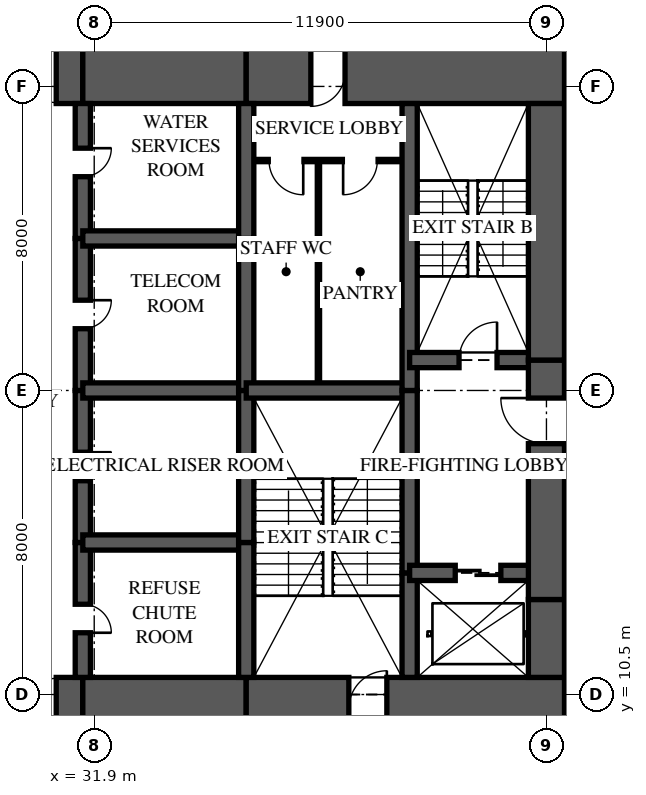
"""IFC4 building model, lengths in metres.
Left out: names, types, materials, properties, quantities, classifications, styles, units other than length and angle.
Written with IfcOpenShell. Run it as: python <this file> out.ifc"""

import sys

from ifc_helpers import new_model, si_unit, direction, frame, frame_2d, origin, place, context, subcontext, project, spatial, rectangle, extrude, element, fill, save


model = new_model("IFC4")
c1 = context("Model", 3, precision=1e-05, world=origin(), true_north=direction((0.0, 1.0)))
c2 = subcontext(c1, "Body", "Model", "MODEL_VIEW")
j1 = project(units=[si_unit("LENGTHUNIT", "METRE"), si_unit("PLANEANGLEUNIT", "RADIAN")], contexts=[c1])
p1 = place(None, origin())
s1 = spatial("IfcSite", under=j1, at=p1, CompositionType="ELEMENT")
p2 = place(p1, origin())
s2 = spatial("IfcBuilding", under=s1, at=p2, CompositionType="ELEMENT")
p3 = place(p2, frame((0.0, 0.0, 21.0)))
s3 = spatial("IfcBuildingStorey", under=s2, at=p3, CompositionType="ELEMENT", Elevation=21.0)
p4 = place(p3, frame((26.0, 10.125, 0.0), z_axis=(0.0, 0.0, 1.0), x_axis=(1.0, 0.0, 0.0)))
e1 = element("IfcWall", 1, at=p4, inside=s3, PredefinedType="SHEAR", context=c2, shape_type="SweptSolid", body=[
    extrude(rectangle(XDim=5.6, YDim=1.65, at=frame_2d((2.8, 0.0))), origin(), (0.0, 0.0, 1.0), 3.35),
])
p5 = place(p4, frame((3.3, 0.0, 0.0)))
e2 = element("IfcOpeningElement", 2, at=p5, cuts=e1, PredefinedType="OPENING", context=c2, shape_type="SweptSolid", body=[
    extrude(rectangle(XDim=1.6, YDim=2.1, at=frame_2d((0.8, 1.05))), frame((0.0, 0.835, 0.0), z_axis=(0.0, -1.0, 0.0), x_axis=(1.0, 0.0, 0.0)), (0.0, 0.0, 1.0), 1.67),
])
p6 = place(p3, frame((31.6, 10.125, 0.0), z_axis=(0.0, 0.0, 1.0), x_axis=(1.0, 0.0, 0.0)))
e3 = element("IfcWall", 3, at=p6, inside=s3, PredefinedType="SHEAR", context=c2, shape_type="SweptSolid", body=[
    extrude(rectangle(XDim=4.3, YDim=1.65, at=frame_2d((2.15, 0.0))), origin(), (0.0, 0.0, 1.0), 3.35),
])
p7 = place(p3, frame((35.9, 10.125, 0.0), z_axis=(0.0, 0.0, 1.0), x_axis=(1.0, 0.0, 0.0)))
e4 = element("IfcWall", 4, at=p7, inside=s3, PredefinedType="SHEAR", context=c2, shape_type="SweptSolid", body=[
    extrude(rectangle(XDim=8.375, YDim=1.65, at=frame_2d((4.188, 0.0))), origin(), (0.0, 0.0, 1.0), 3.35),
])
p8 = place(p7, frame((2.7, 0.0, 0.0)))
e5 = element("IfcOpeningElement", 5, at=p8, cuts=e4, PredefinedType="OPENING", context=c2, shape_type="SweptSolid", body=[
    extrude(rectangle(XDim=1.0, YDim=2.1, at=frame_2d((0.5, 1.05))), frame((0.0, 0.835, 0.0), z_axis=(0.0, -1.0, 0.0), x_axis=(1.0, 0.0, 0.0)), (0.0, 0.0, 1.0), 1.67),
])
p9 = place(p3, frame((44.275, 26.875, 0.0), z_axis=(0.0, 0.0, 1.0), x_axis=(-1.0, 0.0, 0.0)))
e6 = element("IfcWall", 6, at=p9, inside=s3, PredefinedType="SHEAR", context=c2, shape_type="SweptSolid", body=[
    extrude(rectangle(XDim=8.375, YDim=1.65, at=frame_2d((4.188, 0.0))), origin(), (0.0, 0.0, 1.0), 3.35),
])
p10 = place(p9, frame((5.775, 0.0, 0.0)))
e7 = element("IfcOpeningElement", 7, at=p10, cuts=e6, PredefinedType="OPENING", context=c2, shape_type="SweptSolid", body=[
    extrude(rectangle(XDim=0.9, YDim=2.1, at=frame_2d((0.45, 1.05))), frame((0.0, 0.835, 0.0), z_axis=(0.0, -1.0, 0.0), x_axis=(1.0, 0.0, 0.0)), (0.0, 0.0, 1.0), 1.67),
])
p11 = place(p3, frame((35.9, 26.875, 0.0), z_axis=(0.0, 0.0, 1.0), x_axis=(-1.0, 0.0, 0.0)))
e8 = element("IfcWall", 8, at=p11, inside=s3, PredefinedType="SHEAR", context=c2, shape_type="SweptSolid", body=[
    extrude(rectangle(XDim=4.3, YDim=1.65, at=frame_2d((2.15, 0.0))), origin(), (0.0, 0.0, 1.0), 3.35),
])
p12 = place(p3, frame((31.6, 26.875, 0.0), z_axis=(0.0, 0.0, 1.0), x_axis=(-1.0, 0.0, 0.0)))
e9 = element("IfcWall", 9, at=p12, inside=s3, PredefinedType="SHEAR", context=c2, shape_type="SweptSolid", body=[
    extrude(rectangle(XDim=5.6, YDim=1.65, at=frame_2d((2.8, 0.0))), origin(), (0.0, 0.0, 1.0), 3.35),
])
p13 = place(p12, frame((0.7, 0.0, 0.0)))
e10 = element("IfcOpeningElement", 10, at=p13, cuts=e9, PredefinedType="OPENING", context=c2, shape_type="SweptSolid", body=[
    extrude(rectangle(XDim=1.6, YDim=2.1, at=frame_2d((0.8, 1.05))), frame((0.0, 0.835, 0.0), z_axis=(0.0, -1.0, 0.0), x_axis=(1.0, 0.0, 0.0)), (0.0, 0.0, 1.0), 1.67),
])
p14 = place(p3, frame((43.8, 10.95, 0.0), z_axis=(0.0, 0.0, 1.0), x_axis=(0.0, 1.0, 0.0)))
e11 = element("IfcWall", 11, at=p14, inside=s3, PredefinedType="SHEAR", context=c2, shape_type="SweptSolid", body=[
    extrude(rectangle(XDim=2.05, YDim=0.95, at=frame_2d((1.025, 0.0))), origin(), (0.0, 0.0, 1.0), 3.35),
])
p15 = place(p3, frame((43.8, 13.0, 0.0), z_axis=(0.0, 0.0, 1.0), x_axis=(0.0, 1.0, 0.0)))
e12 = element("IfcWall", 12, at=p15, inside=s3, PredefinedType="SHEAR", context=c2, shape_type="SweptSolid", body=[
    extrude(rectangle(XDim=6.3, YDim=0.95, at=frame_2d((3.15, 0.0))), origin(), (0.0, 0.0, 1.0), 3.35),
])
p16 = place(p15, frame((4.1, 0.0, 0.0)))
e13 = element("IfcOpeningElement", 13, at=p16, cuts=e12, PredefinedType="OPENING", context=c2, shape_type="SweptSolid", body=[
    extrude(rectangle(XDim=1.2, YDim=2.2, at=frame_2d((0.6, 1.1))), frame((0.0, 0.485, 0.0), z_axis=(0.0, -1.0, 0.0), x_axis=(1.0, 0.0, 0.0)), (0.0, 0.0, 1.0), 0.97),
])
p17 = place(p3, frame((43.8, 19.3, 0.0), z_axis=(0.0, 0.0, 1.0), x_axis=(0.0, 1.0, 0.0)))
e14 = element("IfcWall", 14, at=p17, inside=s3, PredefinedType="SHEAR", context=c2, shape_type="SweptSolid", body=[
    extrude(rectangle(XDim=6.75, YDim=0.95, at=frame_2d((3.375, 0.0))), origin(), (0.0, 0.0, 1.0), 3.35),
])
p18 = place(p3, frame((31.6, 10.95, 0.0), z_axis=(0.0, 0.0, 1.0), x_axis=(0.0, 1.0, 0.0)))
e15 = element("IfcWall", 15, at=p18, inside=s3, PredefinedType="SHEAR", context=c2, shape_type="SweptSolid", body=[
    extrude(rectangle(XDim=3.55, YDim=0.4, at=frame_2d((1.775, 0.0))), origin(), (0.0, 0.0, 1.0), 3.35),
])
p19 = place(p18, frame((1.175, 0.0, 0.0)))
e16 = element("IfcOpeningElement", 16, at=p19, cuts=e15, PredefinedType="OPENING", context=c2, shape_type="SweptSolid", body=[
    extrude(rectangle(XDim=0.75, YDim=2.1, at=frame_2d((0.375, 1.05))), frame((0.0, 0.21, 0.0), z_axis=(0.0, -1.0, 0.0), x_axis=(1.0, 0.0, 0.0)), (0.0, 0.0, 1.0), 0.42),
])
p20 = place(p3, frame((31.6, 14.5, 0.0), z_axis=(0.0, 0.0, 1.0), x_axis=(0.0, 1.0, 0.0)))
e17 = element("IfcWall", 17, at=p20, inside=s3, PredefinedType="SHEAR", context=c2, shape_type="SweptSolid", body=[
    extrude(rectangle(XDim=4.0, YDim=0.4, at=frame_2d((2.0, 0.0))), origin(), (0.0, 0.0, 1.0), 3.35),
])
p21 = place(p20, frame((1.625, 0.0, 0.0)))
e18 = element("IfcOpeningElement", 18, at=p21, cuts=e17, PredefinedType="OPENING", context=c2, shape_type="SweptSolid", body=[
    extrude(rectangle(XDim=0.75, YDim=2.1, at=frame_2d((0.375, 1.05))), frame((0.0, 0.21, 0.0), z_axis=(0.0, -1.0, 0.0), x_axis=(1.0, 0.0, 0.0)), (0.0, 0.0, 1.0), 0.42),
])
p22 = place(p3, frame((31.6, 18.5, 0.0), z_axis=(0.0, 0.0, 1.0), x_axis=(0.0, 1.0, 0.0)))
e19 = element("IfcWall", 19, at=p22, inside=s3, PredefinedType="SHEAR", context=c2, shape_type="SweptSolid", body=[
    extrude(rectangle(XDim=4.0, YDim=0.4, at=frame_2d((2.0, 0.0))), origin(), (0.0, 0.0, 1.0), 3.35),
])
p23 = place(p22, frame((1.625, 0.0, 0.0)))
e20 = element("IfcOpeningElement", 20, at=p23, cuts=e19, PredefinedType="OPENING", context=c2, shape_type="SweptSolid", body=[
    extrude(rectangle(XDim=0.75, YDim=2.1, at=frame_2d((0.375, 1.05))), frame((0.0, 0.21, 0.0), z_axis=(0.0, -1.0, 0.0), x_axis=(1.0, 0.0, 0.0)), (0.0, 0.0, 1.0), 0.42),
])
p24 = place(p3, frame((31.6, 22.5, 0.0), z_axis=(0.0, 0.0, 1.0), x_axis=(0.0, 1.0, 0.0)))
e21 = element("IfcWall", 21, at=p24, inside=s3, PredefinedType="SHEAR", context=c2, shape_type="SweptSolid", body=[
    extrude(rectangle(XDim=3.55, YDim=0.4, at=frame_2d((1.775, 0.0))), origin(), (0.0, 0.0, 1.0), 3.35),
])
p25 = place(p24, frame((1.625, 0.0, 0.0)))
e22 = element("IfcOpeningElement", 22, at=p25, cuts=e21, PredefinedType="OPENING", context=c2, shape_type="SweptSolid", body=[
    extrude(rectangle(XDim=0.75, YDim=2.1, at=frame_2d((0.375, 1.05))), frame((0.0, 0.21, 0.0), z_axis=(0.0, -1.0, 0.0), x_axis=(1.0, 0.0, 0.0)), (0.0, 0.0, 1.0), 0.42),
])
p26 = place(p3, frame((35.9, 10.95, 0.0), z_axis=(0.0, 0.0, 1.0), x_axis=(0.0, 1.0, 0.0)))
e23 = element("IfcWall", 23, at=p26, inside=s3, PredefinedType="SHEAR", context=c2, shape_type="SweptSolid", body=[
    extrude(rectangle(XDim=3.55, YDim=0.4, at=frame_2d((1.775, 0.0))), origin(), (0.0, 0.0, 1.0), 3.35),
])
for number, where, z_axis, x_axis in (
    (24, (35.9, 14.5, 0.0), (0.0, 0.0, 1.0), (0.0, 1.0, 0.0)),
    (25, (35.9, 18.5, 0.0), (0.0, 0.0, 1.0), (0.0, 1.0, 0.0)),
):
    element("IfcWall", number, at=place(p3, frame(where, z_axis=z_axis, x_axis=x_axis)), inside=s3, PredefinedType="SHEAR", context=c2, shape_type="SweptSolid", body=[
        extrude(rectangle(XDim=4.0, YDim=0.4, at=frame_2d((2.0, 0.0))), origin(), (0.0, 0.0, 1.0), 3.35),
    ])
p27 = place(p3, frame((35.9, 22.5, 0.0), z_axis=(0.0, 0.0, 1.0), x_axis=(0.0, 1.0, 0.0)))
e26 = element("IfcWall", 26, at=p27, inside=s3, PredefinedType="SHEAR", context=c2, shape_type="SweptSolid", body=[
    extrude(rectangle(XDim=3.55, YDim=0.4, at=frame_2d((1.775, 0.0))), origin(), (0.0, 0.0, 1.0), 3.35),
])
p28 = place(p3, frame((40.2, 10.95, 0.0), z_axis=(0.0, 0.0, 1.0), x_axis=(0.0, 1.0, 0.0)))
e27 = element("IfcWall", 27, at=p28, inside=s3, PredefinedType="SHEAR", context=c2, shape_type="SweptSolid", body=[
    extrude(rectangle(XDim=2.75, YDim=0.4, at=frame_2d((1.375, 0.0))), origin(), (0.0, 0.0, 1.0), 3.35),
])
p29 = place(p3, frame((40.2, 13.7, 0.0), z_axis=(0.0, 0.0, 1.0), x_axis=(0.0, 1.0, 0.0)))
e28 = element("IfcWall", 28, at=p29, inside=s3, PredefinedType="SHEAR", context=c2, shape_type="SweptSolid", body=[
    extrude(rectangle(XDim=4.8, YDim=0.4, at=frame_2d((2.4, 0.0))), origin(), (0.0, 0.0, 1.0), 3.35),
])
p30 = place(p3, frame((40.2, 18.5, 0.0), z_axis=(0.0, 0.0, 1.0), x_axis=(0.0, 1.0, 0.0)))
e29 = element("IfcWall", 29, at=p30, inside=s3, PredefinedType="SHEAR", context=c2, shape_type="SweptSolid", body=[
    extrude(rectangle(XDim=7.55, YDim=0.4, at=frame_2d((3.775, 0.0))), origin(), (0.0, 0.0, 1.0), 3.35),
])
for number, where, z_axis, x_axis in (
    (30, (31.6, 14.5, 0.0), (0.0, 0.0, 1.0), (1.0, 0.0, 0.0)),
    (31, (31.6, 18.5, 0.0), (0.0, 0.0, 1.0), (1.0, 0.0, 0.0)),
    (32, (31.6, 22.5, 0.0), (0.0, 0.0, 1.0), (1.0, 0.0, 0.0)),
):
    element("IfcWall", number, at=place(p3, frame(where, z_axis=z_axis, x_axis=x_axis)), inside=s3, PredefinedType="SHEAR", context=c2, shape_type="SweptSolid", body=[
        extrude(rectangle(XDim=4.3, YDim=0.4, at=frame_2d((2.15, 0.0))), origin(), (0.0, 0.0, 1.0), 3.35),
    ])
p31 = place(p3, frame((35.9, 18.5, 0.0), z_axis=(0.0, 0.0, 1.0), x_axis=(1.0, 0.0, 0.0)))
e33 = element("IfcWall", 33, at=p31, inside=s3, PredefinedType="SHEAR", context=c2, shape_type="SweptSolid", body=[
    extrude(rectangle(XDim=4.3, YDim=0.4, at=frame_2d((2.15, 0.0))), origin(), (0.0, 0.0, 1.0), 3.35),
])
p32 = place(p3, frame((40.2, 13.7, 0.0), z_axis=(0.0, 0.0, 1.0), x_axis=(1.0, 0.0, 0.0)))
e34 = element("IfcWall", 34, at=p32, inside=s3, PredefinedType="SHEAR", context=c2, shape_type="SweptSolid", body=[
    extrude(rectangle(XDim=3.6, YDim=0.4, at=frame_2d((1.8, 0.0))), origin(), (0.0, 0.0, 1.0), 3.35),
])
p33 = place(p32, frame((1.2, 0.0, 0.0)))
e35 = element("IfcOpeningElement", 35, at=p33, cuts=e34, PredefinedType="OPENING", context=c2, shape_type="SweptSolid", body=[
    extrude(rectangle(XDim=1.2, YDim=2.1, at=frame_2d((0.6, 1.05))), frame((0.0, 0.21, 0.0), z_axis=(0.0, -1.0, 0.0), x_axis=(1.0, 0.0, 0.0)), (0.0, 0.0, 1.0), 0.42),
])
p34 = place(p3, frame((40.2, 19.3, 0.0), z_axis=(0.0, 0.0, 1.0), x_axis=(1.0, 0.0, 0.0)))
e36 = element("IfcWall", 36, at=p34, inside=s3, PredefinedType="SHEAR", context=c2, shape_type="SweptSolid", body=[
    extrude(rectangle(XDim=3.6, YDim=0.4, at=frame_2d((1.8, 0.0))), origin(), (0.0, 0.0, 1.0), 3.35),
])
p35 = place(p34, frame((1.3, 0.0, 0.0)))
e37 = element("IfcOpeningElement", 37, at=p35, cuts=e36, PredefinedType="OPENING", context=c2, shape_type="SweptSolid", body=[
    extrude(rectangle(XDim=1.0, YDim=2.1, at=frame_2d((0.5, 1.05))), frame((0.0, 0.21, 0.0), z_axis=(0.0, -1.0, 0.0), x_axis=(1.0, 0.0, 0.0)), (0.0, 0.0, 1.0), 0.42),
])
p36 = place(p3, frame((36.1, 24.55, 0.0), z_axis=(0.0, 0.0, 1.0), x_axis=(1.0, 0.0, 0.0)))
e38 = element("IfcWall", 38, at=p36, inside=s3, PredefinedType="PARTITIONING", context=c2, shape_type="SweptSolid", body=[
    extrude(rectangle(XDim=3.9, YDim=0.1, at=frame_2d((1.95, 0.0))), origin(), (0.0, 0.0, 1.0), 3.11),
])
p37 = place(p36, frame((0.4, 0.0, 0.0)))
e39 = element("IfcOpeningElement", 39, at=p37, cuts=e38, PredefinedType="OPENING", context=c2, shape_type="SweptSolid", body=[
    extrude(rectangle(XDim=0.9, YDim=2.1, at=frame_2d((0.45, 1.05))), frame((0.0, 0.06, 0.0), z_axis=(0.0, -1.0, 0.0), x_axis=(1.0, 0.0, 0.0)), (0.0, 0.0, 1.0), 0.12),
])
p38 = place(p36, frame((2.35, 0.0, 0.0)))
e40 = element("IfcOpeningElement", 40, at=p38, cuts=e38, PredefinedType="OPENING", context=c2, shape_type="SweptSolid", body=[
    extrude(rectangle(XDim=0.9, YDim=2.1, at=frame_2d((0.45, 1.05))), frame((0.0, 0.06, 0.0), z_axis=(0.0, -1.0, 0.0), x_axis=(1.0, 0.0, 0.0)), (0.0, 0.0, 1.0), 0.12),
])
p39 = place(p3, frame((37.8, 18.7, 0.0), z_axis=(0.0, 0.0, 1.0), x_axis=(0.0, 1.0, 0.0)))
e41 = element("IfcWall", 41, at=p39, inside=s3, PredefinedType="PARTITIONING", context=c2, shape_type="SweptSolid", body=[
    extrude(rectangle(XDim=5.8, YDim=0.1, at=frame_2d((2.9, 0.0))), origin(), (0.0, 0.0, 1.0), 3.11),
])
p40 = place(p37, frame((0.9, 0.0, 0.0), z_axis=(0.0, 0.0, 1.0), x_axis=(-1.0, 0.0, 0.0)))
e42 = element("IfcDoor", 42, at=p40, inside=s3, OperationType="SINGLE_SWING_LEFT", PredefinedType="DOOR", context=c2, shape_type="SweptSolid", body=[
    extrude(rectangle(XDim=0.9, YDim=2.1, at=frame_2d((0.45, 1.05))), frame((0.0, 0.025, 0.0), z_axis=(0.0, -1.0, 0.0), x_axis=(1.0, 0.0, 0.0)), (0.0, 0.0, 1.0), 0.05),
])
fill(e39, e42)
p41 = place(p38, frame((0.9, 0.0, 0.0), z_axis=(0.0, 0.0, 1.0), x_axis=(-1.0, 0.0, 0.0)))
e43 = element("IfcDoor", 43, at=p41, inside=s3, OperationType="SINGLE_SWING_RIGHT", PredefinedType="DOOR", context=c2, shape_type="SweptSolid", body=[
    extrude(rectangle(XDim=0.9, YDim=2.1, at=frame_2d((0.45, 1.05))), frame((0.0, 0.025, 0.0), z_axis=(0.0, -1.0, 0.0), x_axis=(1.0, 0.0, 0.0)), (0.0, 0.0, 1.0), 0.05),
])
fill(e40, e43)
p42 = place(p35, origin())
e44 = element("IfcDoor", 44, at=p42, inside=s3, OperationType="SINGLE_SWING_RIGHT", PredefinedType="DOOR", context=c2, shape_type="SweptSolid", body=[
    extrude(rectangle(XDim=1.0, YDim=2.1, at=frame_2d((0.5, 1.05))), frame((0.0, 0.025, 0.0), z_axis=(0.0, -1.0, 0.0), x_axis=(1.0, 0.0, 0.0)), (0.0, 0.0, 1.0), 0.05),
])
fill(e37, e44)
p43 = place(p16, origin())
e45 = element("IfcDoor", 45, at=p43, inside=s3, OperationType="SINGLE_SWING_RIGHT", PredefinedType="DOOR", context=c2, shape_type="SweptSolid", body=[
    extrude(rectangle(XDim=1.2, YDim=2.2, at=frame_2d((0.6, 1.1))), frame((0.0, 0.025, 0.0), z_axis=(0.0, -1.0, 0.0), x_axis=(1.0, 0.0, 0.0)), (0.0, 0.0, 1.0), 0.05),
])
fill(e13, e45)
p44 = place(p33, origin())
e46 = element("IfcDoor", 46, at=p44, inside=s3, OperationType="SLIDING_TO_LEFT", PredefinedType="DOOR", context=c2, shape_type="SweptSolid", body=[
    extrude(rectangle(XDim=1.2, YDim=2.1, at=frame_2d((0.6, 1.05))), frame((0.0, 0.025, 0.0), z_axis=(0.0, -1.0, 0.0), x_axis=(1.0, 0.0, 0.0)), (0.0, 0.0, 1.0), 0.05),
])
fill(e35, e46)
p45 = place(p5, origin())
e47 = element("IfcDoor", 47, at=p45, inside=s3, OperationType="DOUBLE_DOOR_SINGLE_SWING", PredefinedType="DOOR", context=c2, shape_type="SweptSolid", body=[
    extrude(rectangle(XDim=1.6, YDim=2.1, at=frame_2d((0.8, 1.05))), frame((0.0, 0.025, 0.0), z_axis=(0.0, -1.0, 0.0), x_axis=(1.0, 0.0, 0.0)), (0.0, 0.0, 1.0), 0.05),
])
fill(e2, e47)
p46 = place(p13, origin())
e48 = element("IfcDoor", 48, at=p46, inside=s3, OperationType="DOUBLE_DOOR_SINGLE_SWING", PredefinedType="DOOR", context=c2, shape_type="SweptSolid", body=[
    extrude(rectangle(XDim=1.6, YDim=2.1, at=frame_2d((0.8, 1.05))), frame((0.0, 0.025, 0.0), z_axis=(0.0, -1.0, 0.0), x_axis=(1.0, 0.0, 0.0)), (0.0, 0.0, 1.0), 0.05),
])
fill(e10, e48)
p47 = place(p19, frame((0.75, 0.0, 0.0), z_axis=(0.0, 0.0, 1.0), x_axis=(-1.0, 0.0, 0.0)))
e49 = element("IfcDoor", 49, at=p47, inside=s3, OperationType="SINGLE_SWING_RIGHT", PredefinedType="DOOR", context=c2, shape_type="SweptSolid", body=[
    extrude(rectangle(XDim=0.75, YDim=2.1, at=frame_2d((0.375, 1.05))), frame((0.0, 0.025, 0.0), z_axis=(0.0, -1.0, 0.0), x_axis=(1.0, 0.0, 0.0)), (0.0, 0.0, 1.0), 0.05),
])
fill(e16, e49)
p48 = place(p21, frame((0.75, 0.0, 0.0), z_axis=(0.0, 0.0, 1.0), x_axis=(-1.0, 0.0, 0.0)))
e50 = element("IfcDoor", 50, at=p48, inside=s3, OperationType="SINGLE_SWING_LEFT", PredefinedType="DOOR", context=c2, shape_type="SweptSolid", body=[
    extrude(rectangle(XDim=0.75, YDim=2.1, at=frame_2d((0.375, 1.05))), frame((0.0, 0.025, 0.0), z_axis=(0.0, -1.0, 0.0), x_axis=(1.0, 0.0, 0.0)), (0.0, 0.0, 1.0), 0.05),
])
fill(e18, e50)
p49 = place(p23, frame((0.75, 0.0, 0.0), z_axis=(0.0, 0.0, 1.0), x_axis=(-1.0, 0.0, 0.0)))
e51 = element("IfcDoor", 51, at=p49, inside=s3, OperationType="SINGLE_SWING_LEFT", PredefinedType="DOOR", context=c2, shape_type="SweptSolid", body=[
    extrude(rectangle(XDim=0.75, YDim=2.1, at=frame_2d((0.375, 1.05))), frame((0.0, 0.025, 0.0), z_axis=(0.0, -1.0, 0.0), x_axis=(1.0, 0.0, 0.0)), (0.0, 0.0, 1.0), 0.05),
])
fill(e20, e51)
p50 = place(p25, frame((0.75, 0.0, 0.0), z_axis=(0.0, 0.0, 1.0), x_axis=(-1.0, 0.0, 0.0)))
e52 = element("IfcDoor", 52, at=p50, inside=s3, OperationType="SINGLE_SWING_LEFT", PredefinedType="DOOR", context=c2, shape_type="SweptSolid", body=[
    extrude(rectangle(XDim=0.75, YDim=2.1, at=frame_2d((0.375, 1.05))), frame((0.0, 0.025, 0.0), z_axis=(0.0, -1.0, 0.0), x_axis=(1.0, 0.0, 0.0)), (0.0, 0.0, 1.0), 0.05),
])
fill(e22, e52)
p51 = place(p8, origin())
e53 = element("IfcDoor", 53, at=p51, inside=s3, OperationType="SINGLE_SWING_RIGHT", PredefinedType="DOOR", context=c2, shape_type="SweptSolid", body=[
    extrude(rectangle(XDim=1.0, YDim=2.1, at=frame_2d((0.5, 1.05))), frame((0.0, 0.025, 0.0), z_axis=(0.0, -1.0, 0.0), x_axis=(1.0, 0.0, 0.0)), (0.0, 0.0, 1.0), 0.05),
])
fill(e5, e53)
p52 = place(p10, origin())
e54 = element("IfcDoor", 54, at=p52, inside=s3, OperationType="SINGLE_SWING_RIGHT", PredefinedType="DOOR", context=c2, shape_type="SweptSolid", body=[
    extrude(rectangle(XDim=0.9, YDim=2.1, at=frame_2d((0.45, 1.05))), frame((0.0, 0.47, 0.0), z_axis=(0.0, -1.0, 0.0), x_axis=(1.0, 0.0, 0.0)), (0.0, 0.0, 1.0), 0.8),
])
fill(e7, e54)
save(model, sys.argv[1])
